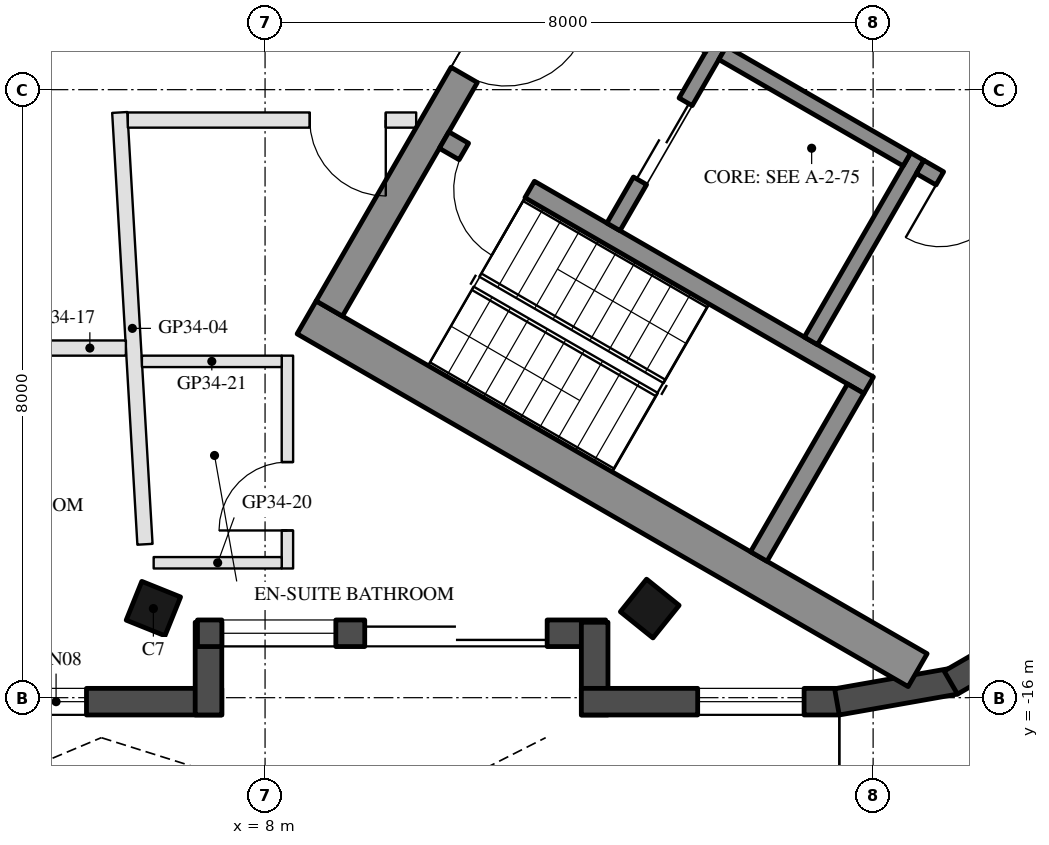
"""IFC4 building model, lengths in metres.
Left out: names, types, materials, properties, quantities, classifications, styles, units other than length and angle.
Written with IfcOpenShell. Run it as: python <this file> out.ifc"""

import sys

from ifc_helpers import new_model, si_unit, direction, frame, frame_2d, origin, origin_2d, place, context, subcontext, project, spatial, rectangle, hollow_rectangle, extrude, boolean, halfspace, element, fill, save


model = new_model("IFC4")
c1 = context("Model", 3, precision=1e-05, world=origin(), true_north=direction((0.0, 1.0)))
c2 = subcontext(c1, "Body", "Model", "MODEL_VIEW")
j1 = project(units=[si_unit("LENGTHUNIT", "METRE"), si_unit("PLANEANGLEUNIT", "RADIAN")], contexts=[c1])
p1 = place(None, origin())
s1 = spatial("IfcSite", under=j1, at=p1, CompositionType="ELEMENT")
p2 = place(p1, origin())
s2 = spatial("IfcBuilding", under=s1, at=p2, CompositionType="ELEMENT")
p3 = place(p2, frame((0.0, 0.0, 320.7)))
s3 = spatial("IfcBuildingStorey", under=s2, at=p3, CompositionType="ELEMENT", Elevation=320.7)
p4 = place(p3, frame((6.531, -14.827, 0.0), z_axis=(-0.060871062735, 0.151168564354, 0.986632038235), x_axis=(0.998135304591, 0.004721094283, 0.0608574153)))
e1 = element("IfcColumn", 1, at=p4, inside=s3, PredefinedType="COLUMN", context=c2, shape_type="SweptSolid", body=[
    boolean("DIFFERENCE", boolean("DIFFERENCE", extrude(hollow_rectangle(XDim=0.55, YDim=0.55, WallThickness=0.025, at=origin_2d()), origin(), (0.0, 0.0, 1.0), 3.75), halfspace(frame((0.0, 0.0, 0.034), z_axis=(0.0, 0.0, 1.0), x_axis=(1.0, 0.0, 0.0)), True)), halfspace(frame((0.0, 0.0, 3.716), z_axis=(0.0, 0.0, 1.0), x_axis=(1.0, 0.0, 0.0)), False)),
])
p5 = place(p3, frame((13.061, -14.827, 0.0), z_axis=(-0.121007284992, 0.150336498529, 0.981201393287), x_axis=(0.992609775631, 0.009249858451, 0.120996997646)))
e2 = element("IfcColumn", 2, at=p5, inside=s3, PredefinedType="COLUMN", context=c2, shape_type="SweptSolid", body=[
    boolean("DIFFERENCE", boolean("DIFFERENCE", extrude(hollow_rectangle(XDim=0.55, YDim=0.55, WallThickness=0.025, at=origin_2d()), origin(), (0.0, 0.0, 1.0), 3.771), halfspace(frame((0.0, 0.0, 0.04), z_axis=(0.0, 0.0, 1.0), x_axis=(1.0, 0.0, 0.0)), True)), halfspace(frame((0.0, 0.0, 3.731), z_axis=(0.0, 0.0, 1.0), x_axis=(1.0, 0.0, 0.0)), False)),
])
p6 = place(p3, frame((-0.9, -16.052, 0.0), z_axis=(0.0, 0.0, 1.0), x_axis=(1.0, 0.0, 0.0)))
e3 = element("IfcWall", 3, at=p6, inside=s3, PredefinedType="SOLIDWALL", context=c2, shape_type="SweptSolid", body=[
    extrude(rectangle(XDim=8.331, YDim=0.35, at=frame_2d((4.165, 0.0))), origin(), (0.0, 0.0, 1.0), 3.55),
])
p7 = place(p6, frame((1.539, 0.0, 0.0)))
e4 = element("IfcOpeningElement", 4, at=p7, cuts=e3, PredefinedType="OPENING", context=c2, shape_type="SweptSolid", body=[
    extrude(rectangle(XDim=1.2, YDim=2.4, at=frame_2d((0.6, 1.2))), frame((0.0, 0.185, 0.0), z_axis=(0.0, -1.0, 0.0), x_axis=(1.0, 0.0, 0.0)), (0.0, 0.0, 1.0), 0.37),
])
p8 = place(p6, frame((3.65, 0.0, 0.0)))
e5 = element("IfcOpeningElement", 5, at=p8, cuts=e3, PredefinedType="OPENING", context=c2, shape_type="SweptSolid", body=[
    extrude(rectangle(XDim=1.8, YDim=2.4, at=frame_2d((0.9, 1.2))), frame((0.0, 0.185, 0.0), z_axis=(0.0, -1.0, 0.0), x_axis=(1.0, 0.0, 0.0)), (0.0, 0.0, 1.0), 0.37),
])
p9 = place(p6, frame((5.75, 0.0, 0.3)))
e6 = element("IfcOpeningElement", 6, at=p9, cuts=e3, PredefinedType="OPENING", context=c2, shape_type="SweptSolid", body=[
    extrude(rectangle(XDim=0.8, YDim=2.65, at=frame_2d((0.4, 1.325))), frame((0.0, 0.185, 0.0), z_axis=(0.0, -1.0, 0.0), x_axis=(1.0, 0.0, 0.0)), (0.0, 0.0, 1.0), 0.37),
])
p10 = place(p3, frame((7.256, -16.228, 0.0), z_axis=(0.0, 0.0, 1.0), x_axis=(0.0, 1.0, 0.0)))
e7 = element("IfcWall", 7, at=p10, inside=s3, PredefinedType="SOLIDWALL", context=c2, shape_type="SweptSolid", body=[
    extrude(rectangle(XDim=1.22, YDim=0.35, at=frame_2d((0.61, 0.0))), origin(), (0.0, 0.0, 1.0), 3.55),
])
p11 = place(p3, frame((7.111, -15.153, 0.0), z_axis=(0.0, 0.0, 1.0), x_axis=(1.0, 0.0, 0.0)))
e8 = element("IfcWall", 8, at=p11, inside=s3, PredefinedType="SOLIDWALL", context=c2, shape_type="SweptSolid", body=[
    extrude(rectangle(XDim=5.371, YDim=0.35, at=frame_2d((2.686, 0.0))), origin(), (0.0, 0.0, 1.0), 3.55),
])
p12 = place(p11, frame((2.201, 0.0, 0.0)))
e9 = element("IfcOpeningElement", 9, at=p12, cuts=e8, PredefinedType="OPENING", context=c2, shape_type="SweptSolid", body=[
    extrude(rectangle(XDim=2.4, YDim=2.4, at=frame_2d((1.2, 1.2))), frame((0.0, 0.185, 0.0), z_axis=(0.0, -1.0, 0.0), x_axis=(1.0, 0.0, 0.0)), (0.0, 0.0, 1.0), 0.37),
])
p13 = place(p11, frame((0.32, 0.0, 0.3)))
e10 = element("IfcOpeningElement", 10, at=p13, cuts=e8, PredefinedType="OPENING", context=c2, shape_type="SweptSolid", body=[
    extrude(rectangle(XDim=1.5, YDim=2.65, at=frame_2d((0.75, 1.325))), frame((0.0, 0.185, 0.0), z_axis=(0.0, -1.0, 0.0), x_axis=(1.0, 0.0, 0.0)), (0.0, 0.0, 1.0), 0.37),
])
p14 = place(p3, frame((12.336, -15.008, 0.0), z_axis=(0.0, 0.0, 1.0), x_axis=(0.0, -1.0, 0.0)))
e11 = element("IfcWall", 11, at=p14, inside=s3, PredefinedType="SOLIDWALL", context=c2, shape_type="SweptSolid", body=[
    extrude(rectangle(XDim=1.22, YDim=0.35, at=frame_2d((0.61, 0.0))), origin(), (0.0, 0.0, 1.0), 3.55),
])
p15 = place(p3, frame((12.161, -16.052, 0.0), z_axis=(0.0, 0.0, 1.0), x_axis=(1.0, 0.0, 0.0)))
e12 = element("IfcWall", 12, at=p15, inside=s3, PredefinedType="SOLIDWALL", context=c2, shape_type="SweptSolid", body=[
    extrude(rectangle(XDim=3.393, YDim=0.35, at=frame_2d((1.697, 0.0))), origin(), (0.0, 0.0, 1.0), 3.55),
])
p16 = place(p15, frame((1.531, 0.0, 0.3)))
e13 = element("IfcOpeningElement", 13, at=p16, cuts=e12, PredefinedType="OPENING", context=c2, shape_type="SweptSolid", body=[
    extrude(rectangle(XDim=1.4, YDim=2.65, at=frame_2d((0.7, 1.325))), frame((0.0, 0.185, 0.0), z_axis=(0.0, -1.0, 0.0), x_axis=(1.0, 0.0, 0.0)), (0.0, 0.0, 1.0), 0.37),
])
for number, where, z_axis, x_axis in (
    (14, (15.524, -16.055, 0.0), (0.0, 0.0, 1.0), (0.985, 0.174, 0.0)),
    (15, (17.022, -15.802, 0.0), (0.0, 0.0, 1.0), (0.866, 0.5, 0.0)),
):
    element("IfcWall", number, at=place(p3, frame(where, z_axis=z_axis, x_axis=x_axis)), inside=s3, PredefinedType="SOLIDWALL", context=c2, shape_type="SweptSolid", body=[
        extrude(rectangle(XDim=1.579, YDim=0.35, at=frame_2d((0.79, 0.0))), origin(), (0.0, 0.0, 1.0), 3.55),
    ])
p17 = place(p3, frame((8.547, -10.997, 0.0), z_axis=(0.0, 0.0, 1.0), x_axis=(0.866025286072, -0.500000203884, 0.0)))
e16 = element("IfcWall", 16, at=p17, inside=s3, PredefinedType="SHEAR", context=c2, shape_type="SweptSolid", body=[
    extrude(rectangle(XDim=9.283, YDim=0.5, at=frame_2d((4.641, 0.0))), origin(), (0.0, 0.0, 1.0), 3.5),
])
p18 = place(p3, frame((8.845, -10.88, 0.0), z_axis=(0.0, 0.0, 1.0), x_axis=(0.500004234368, 0.866022959057, 0.0)))
e17 = element("IfcWall", 17, at=p18, inside=s3, PredefinedType="SHEAR", context=c2, shape_type="SweptSolid", body=[
    extrude(rectangle(XDim=10.0, YDim=0.4, at=frame_2d((5.0, 0.0))), origin(), (0.0, 0.0, 1.0), 3.5),
])
p19 = place(p18, frame((3.55, 0.0, 0.0)))
e18 = element("IfcOpeningElement", 18, at=p19, cuts=e17, PredefinedType="OPENING", context=c2, shape_type="SweptSolid", body=[
    extrude(rectangle(XDim=1.1, YDim=2.1, at=frame_2d((0.55, 1.05))), frame((0.0, 0.21, 0.0), z_axis=(0.0, -1.0, 0.0), x_axis=(1.0, 0.0, 0.0)), (0.0, 0.0, 1.0), 0.42),
])
p20 = place(p18, frame((5.85, 0.0, 0.0)))
e19 = element("IfcOpeningElement", 19, at=p20, cuts=e17, PredefinedType="OPENING", context=c2, shape_type="SweptSolid", body=[
    extrude(rectangle(XDim=1.4, YDim=2.1, at=frame_2d((0.7, 1.05))), frame((0.0, 0.21, 0.0), z_axis=(0.0, -1.0, 0.0), x_axis=(1.0, 0.0, 0.0)), (0.0, 0.0, 1.0), 0.42),
])
p21 = place(p3, frame((10.356, -8.664, 0.0), z_axis=(0.0, 0.0, 1.0), x_axis=(0.866028629588, -0.499994412703, 0.0)))
e20 = element("IfcWall", 20, at=p21, inside=s3, PredefinedType="SHEAR", context=c2, shape_type="SweptSolid", body=[
    extrude(rectangle(XDim=6.45, YDim=0.25, at=frame_2d((3.225, 0.0))), origin(), (0.0, 0.0, 1.0), 3.5),
])
p22 = place(p21, frame((0.3, 0.0, 0.0)))
e21 = element("IfcOpeningElement", 21, at=p22, cuts=e20, PredefinedType="OPENING", context=c2, shape_type="SweptSolid", body=[
    extrude(rectangle(XDim=1.0, YDim=2.1, at=frame_2d((0.5, 1.05))), frame((0.0, 0.135, 0.0), z_axis=(0.0, -1.0, 0.0), x_axis=(1.0, 0.0, 0.0)), (0.0, 0.0, 1.0), 0.27),
])
p23 = place(p3, frame((14.496, -14.143, 0.0), z_axis=(0.0, 0.0, 1.0), x_axis=(0.500062241894, 0.865989465428, 0.0)))
e22 = element("IfcWall", 22, at=p23, inside=s3, PredefinedType="SHEAR", context=c2, shape_type="SweptSolid", body=[
    extrude(rectangle(XDim=2.55, YDim=0.25, at=frame_2d((1.275, 0.0))), origin(), (0.0, 0.0, 1.0), 3.5),
])
p24 = place(p3, frame((15.181, -11.305, 0.0), z_axis=(0.0, 0.0, 1.0), x_axis=(0.49994636267, 0.866056369097, 0.0)))
e23 = element("IfcWall", 23, at=p24, inside=s3, PredefinedType="SHEAR", context=c2, shape_type="SweptSolid", body=[
    extrude(rectangle(XDim=2.8, YDim=0.2, at=frame_2d((1.4, 0.0))), origin(), (0.0, 0.0, 1.0), 3.5),
])
p25 = place(p3, frame((12.583, -9.805, 0.0), z_axis=(0.0, 0.0, 1.0), x_axis=(0.49994636267, 0.866056369097, 0.0)))
e24 = element("IfcWall", 24, at=p25, inside=s3, PredefinedType="SHEAR", context=c2, shape_type="SweptSolid", body=[
    extrude(rectangle(XDim=2.8, YDim=0.2, at=frame_2d((1.4, 0.0))), origin(), (0.0, 0.0, 1.0), 3.5),
])
p26 = place(p25, frame((0.7, 0.0, 0.0)))
e25 = element("IfcOpeningElement", 25, at=p26, cuts=e24, PredefinedType="OPENING", context=c2, shape_type="SweptSolid", body=[
    extrude(rectangle(XDim=1.2, YDim=2.1, at=frame_2d((0.6, 1.05))), frame((0.0, 0.11, 0.0), z_axis=(0.0, -1.0, 0.0), x_axis=(1.0, 0.0, 0.0)), (0.0, 0.0, 1.0), 0.22),
])
p27 = place(p3, frame((11.768, -6.217, 0.0), z_axis=(0.0, 0.0, 1.0), x_axis=(0.866050077142, -0.499957262057, 0.0)))
e26 = element("IfcWall", 26, at=p27, inside=s3, PredefinedType="SHEAR", context=c2, shape_type="SweptSolid", body=[
    extrude(rectangle(XDim=2.4, YDim=0.2, at=frame_2d((1.2, 0.0))), origin(), (0.0, 0.0, 1.0), 3.5),
])
p28 = place(p3, frame((14.02, -7.517, 0.0), z_axis=(0.0, 0.0, 1.0), x_axis=(0.866034573852, -0.49998411664, 0.0)))
e27 = element("IfcWall", 27, at=p28, inside=s3, PredefinedType="SHEAR", context=c2, shape_type="SweptSolid", body=[
    extrude(rectangle(XDim=2.8, YDim=0.2, at=frame_2d((1.4, 0.0))), origin(), (0.0, 0.0, 1.0), 3.5),
])
p29 = place(p3, frame((12.968, -4.138, 0.0), z_axis=(0.0, 0.0, 1.0), x_axis=(0.866025710499, -0.499999468754, 0.0)))
e28 = element("IfcWall", 28, at=p29, inside=s3, PredefinedType="SHEAR", context=c2, shape_type="SweptSolid", body=[
    extrude(rectangle(XDim=10.121, YDim=0.2, at=frame_2d((5.061, 0.0))), origin(), (0.0, 0.0, 1.0), 3.5),
])
p30 = place(p29, frame((0.62, 0.0, 0.0)))
e29 = element("IfcOpeningElement", 29, at=p30, cuts=e28, PredefinedType="OPENING", context=c2, shape_type="SweptSolid", body=[
    extrude(rectangle(XDim=1.1, YDim=2.1, at=frame_2d((0.55, 1.05))), frame((0.0, 0.11, 0.0), z_axis=(0.0, -1.0, 0.0), x_axis=(1.0, 0.0, 0.0)), (0.0, 0.0, 1.0), 0.22),
])
p31 = place(p29, frame((5.8, 0.0, 0.0)))
e30 = element("IfcOpeningElement", 30, at=p31, cuts=e28, PredefinedType="OPENING", context=c2, shape_type="SweptSolid", body=[
    extrude(rectangle(XDim=0.9, YDim=2.1, at=frame_2d((0.45, 1.05))), frame((0.0, 0.11, 0.0), z_axis=(0.0, -1.0, 0.0), x_axis=(1.0, 0.0, 0.0)), (0.0, 0.0, 1.0), 0.22),
])
p32 = place(p3, frame((16.618, -9.017, 0.0), z_axis=(0.0, 0.0, 1.0), x_axis=(0.866045268016, -0.499965592563, 0.0)))
e31 = element("IfcWall", 31, at=p32, inside=s3, PredefinedType="SHEAR", context=c2, shape_type="SweptSolid", body=[
    extrude(rectangle(XDim=2.608, YDim=0.2, at=frame_2d((1.304, 0.0))), origin(), (0.0, 0.0, 1.0), 3.5),
])
p33 = place(p32, frame((0.3, 0.0, 0.0)))
e32 = element("IfcOpeningElement", 32, at=p33, cuts=e31, PredefinedType="OPENING", context=c2, shape_type="SweptSolid", body=[
    extrude(rectangle(XDim=0.9, YDim=2.1, at=frame_2d((0.45, 1.05))), frame((0.0, 0.11, 0.0), z_axis=(0.0, -1.0, 0.0), x_axis=(1.0, 0.0, 0.0)), (0.0, 0.0, 1.0), 0.22),
])
p34 = place(p3, frame((6.42, -13.982, 0.0), z_axis=(0.0, 0.0, 1.0), x_axis=(-0.058254288977, 0.998301776927, 0.0)))
e33 = element("IfcWall", 33, at=p34, inside=s3, PredefinedType="PARTITIONING", context=c2, shape_type="SweptSolid", body=[
    extrude(rectangle(XDim=5.691, YDim=0.2, at=frame_2d((2.846, 0.0))), origin(), (0.0, 0.0, 1.0), 3.15),
])
p35 = place(p3, frame((6.169, -11.4, 0.0), z_axis=(0.0, 0.0, 1.0), x_axis=(-1.0, 0.0, 0.0)))
e34 = element("IfcWall", 34, at=p35, inside=s3, PredefinedType="PARTITIONING", context=c2, shape_type="SweptSolid", body=[
    extrude(rectangle(XDim=3.951, YDim=0.2, at=frame_2d((1.976, 0.0))), origin(), (0.0, 0.0, 1.0), 3.15),
])
p36 = place(p35, frame((1.476, 0.0, 0.0)))
e35 = element("IfcOpeningElement", 35, at=p36, cuts=e34, PredefinedType="OPENING", context=c2, shape_type="SweptSolid", body=[
    extrude(rectangle(XDim=1.0, YDim=2.1, at=frame_2d((0.5, 1.05))), frame((0.0, 0.11, 0.0), z_axis=(0.0, -1.0, 0.0), x_axis=(1.0, 0.0, 0.0)), (0.0, 0.0, 1.0), 0.22),
])
p37 = place(p3, frame((9.988, -8.4, 0.0), z_axis=(0.0, 0.0, 1.0), x_axis=(-1.0, 0.0, 0.0)))
e36 = element("IfcWall", 36, at=p37, inside=s3, PredefinedType="PARTITIONING", context=c2, shape_type="SweptSolid", body=[
    extrude(rectangle(XDim=3.794, YDim=0.2, at=frame_2d((1.897, 0.0))), origin(), (0.0, 0.0, 1.0), 3.15),
])
p38 = place(p37, frame((0.4, 0.0, 0.0)))
e37 = element("IfcOpeningElement", 37, at=p38, cuts=e36, PredefinedType="OPENING", context=c2, shape_type="SweptSolid", body=[
    extrude(rectangle(XDim=1.0, YDim=2.1, at=frame_2d((0.5, 1.05))), frame((0.0, 0.11, 0.0), z_axis=(0.0, -1.0, 0.0), x_axis=(1.0, 0.0, 0.0)), (0.0, 0.0, 1.0), 0.22),
])
p39 = place(p3, frame((8.294, -14.3, 0.0), z_axis=(0.0, 0.0, 1.0), x_axis=(0.0, 1.0, 0.0)))
e38 = element("IfcWall", 38, at=p39, inside=s3, PredefinedType="PARTITIONING", context=c2, shape_type="SweptSolid", body=[
    extrude(rectangle(XDim=2.8, YDim=0.15, at=frame_2d((1.4, 0.0))), origin(), (0.0, 0.0, 1.0), 3.1),
])
p40 = place(p39, frame((0.5, 0.0, 0.0)))
e39 = element("IfcOpeningElement", 39, at=p40, cuts=e38, PredefinedType="OPENING", context=c2, shape_type="SweptSolid", body=[
    extrude(rectangle(XDim=0.9, YDim=2.1, at=frame_2d((0.45, 1.05))), frame((0.0, 0.085, 0.0), z_axis=(0.0, -1.0, 0.0), x_axis=(1.0, 0.0, 0.0)), (0.0, 0.0, 1.0), 0.17),
])
p41 = place(p3, frame((6.534, -14.225, 0.0), z_axis=(0.0, 0.0, 1.0), x_axis=(1.0, 0.0, 0.0)))
e40 = element("IfcWall", 40, at=p41, inside=s3, PredefinedType="PARTITIONING", context=c2, shape_type="SweptSolid", body=[
    extrude(rectangle(XDim=1.685, YDim=0.15, at=frame_2d((0.842, 0.0))), origin(), (0.0, 0.0, 1.0), 3.1),
])
p42 = place(p3, frame((6.38, -11.575, 0.0), z_axis=(0.0, 0.0, 1.0), x_axis=(1.0, 0.0, 0.0)))
e41 = element("IfcWall", 41, at=p42, inside=s3, PredefinedType="PARTITIONING", context=c2, shape_type="SweptSolid", body=[
    extrude(rectangle(XDim=1.839, YDim=0.15, at=frame_2d((0.92, 0.0))), origin(), (0.0, 0.0, 1.0), 3.15),
])
p43 = place(p9, origin())
e42 = element("IfcWindow", 42, at=p43, inside=s3, PartitioningType="SINGLE_PANEL", PredefinedType="WINDOW", context=c2, shape_type="SweptSolid", body=[
    extrude(rectangle(XDim=0.8, YDim=2.65, at=frame_2d((0.4, 1.325))), frame((0.0, 0.03, 0.0), z_axis=(0.0, -1.0, 0.0), x_axis=(1.0, 0.0, 0.0)), (0.0, 0.0, 1.0), 0.06),
])
fill(e6, e42)
p44 = place(p12, frame((2.4, 0.0, 0.0), z_axis=(0.0, 0.0, 1.0), x_axis=(-1.0, 0.0, 0.0)))
e43 = element("IfcDoor", 43, at=p44, inside=s3, OperationType="SLIDING_TO_LEFT", PredefinedType="DOOR", context=c2, shape_type="SweptSolid", body=[
    extrude(rectangle(XDim=2.4, YDim=2.4, at=frame_2d((1.2, 1.2))), frame((0.0, 0.025, 0.0), z_axis=(0.0, -1.0, 0.0), x_axis=(1.0, 0.0, 0.0)), (0.0, 0.0, 1.0), 0.05),
])
fill(e9, e43)
p45 = place(p13, origin())
e44 = element("IfcWindow", 44, at=p45, inside=s3, PartitioningType="SINGLE_PANEL", PredefinedType="WINDOW", context=c2, shape_type="SweptSolid", body=[
    extrude(rectangle(XDim=1.5, YDim=2.65, at=frame_2d((0.75, 1.325))), frame((0.0, 0.03, 0.0), z_axis=(0.0, -1.0, 0.0), x_axis=(1.0, 0.0, 0.0)), (0.0, 0.0, 1.0), 0.06),
])
fill(e10, e44)
p46 = place(p16, origin())
e45 = element("IfcWindow", 45, at=p46, inside=s3, PartitioningType="SINGLE_PANEL", PredefinedType="WINDOW", context=c2, shape_type="SweptSolid", body=[
    extrude(rectangle(XDim=1.4, YDim=2.65, at=frame_2d((0.7, 1.325))), frame((0.0, 0.03, 0.0), z_axis=(0.0, -1.0, 0.0), x_axis=(1.0, 0.0, 0.0)), (0.0, 0.0, 1.0), 0.06),
])
fill(e13, e45)
p47 = place(p26, origin())
e46 = element("IfcDoor", 46, at=p47, inside=s3, OperationType="DOUBLE_DOOR_SLIDING", PredefinedType="DOOR", context=c2, shape_type="SweptSolid", body=[
    extrude(rectangle(XDim=1.2, YDim=2.1, at=frame_2d((0.6, 1.05))), frame((0.0, 0.025, 0.0), z_axis=(0.0, -1.0, 0.0), x_axis=(1.0, 0.0, 0.0)), (0.0, 0.0, 1.0), 0.05),
])
fill(e25, e46)
p48 = place(p33, frame((0.9, 0.0, 0.0), z_axis=(0.0, 0.0, 1.0), x_axis=(-1.0, 0.0, 0.0)))
e47 = element("IfcDoor", 47, at=p48, inside=s3, OperationType="SINGLE_SWING_RIGHT", PredefinedType="DOOR", context=c2, shape_type="SweptSolid", body=[
    extrude(rectangle(XDim=0.9, YDim=2.1, at=frame_2d((0.45, 1.05))), frame((0.0, 0.025, 0.0), z_axis=(0.0, -1.0, 0.0), x_axis=(1.0, 0.0, 0.0)), (0.0, 0.0, 1.0), 0.05),
])
fill(e32, e47)
p49 = place(p19, frame((1.1, 0.0, 0.0), z_axis=(0.0, 0.0, 1.0), x_axis=(-1.0, 0.0, 0.0)))
e48 = element("IfcDoor", 48, at=p49, inside=s3, OperationType="SINGLE_SWING_LEFT", PredefinedType="DOOR", context=c2, shape_type="SweptSolid", body=[
    extrude(rectangle(XDim=1.1, YDim=2.1, at=frame_2d((0.55, 1.05))), frame((0.0, 0.025, 0.0), z_axis=(0.0, -1.0, 0.0), x_axis=(1.0, 0.0, 0.0)), (0.0, 0.0, 1.0), 0.05),
])
fill(e18, e48)
p50 = place(p22, frame((1.0, 0.0, 0.0), z_axis=(0.0, 0.0, 1.0), x_axis=(-1.0, 0.0, 0.0)))
e49 = element("IfcDoor", 49, at=p50, inside=s3, OperationType="SINGLE_SWING_LEFT", PredefinedType="DOOR", context=c2, shape_type="SweptSolid", body=[
    extrude(rectangle(XDim=1.0, YDim=2.1, at=frame_2d((0.5, 1.05))), frame((0.0, 0.025, 0.0), z_axis=(0.0, -1.0, 0.0), x_axis=(1.0, 0.0, 0.0)), (0.0, 0.0, 1.0), 0.05),
])
fill(e21, e49)
p51 = place(p40, origin())
e50 = element("IfcDoor", 50, at=p51, inside=s3, OperationType="SINGLE_SWING_LEFT", PredefinedType="DOOR", context=c2, shape_type="SweptSolid", body=[
    extrude(rectangle(XDim=0.9, YDim=2.1, at=frame_2d((0.45, 1.05))), frame((0.0, 0.025, 0.0), z_axis=(0.0, -1.0, 0.0), x_axis=(1.0, 0.0, 0.0)), (0.0, 0.0, 1.0), 0.05),
])
fill(e39, e50)
p52 = place(p38, origin())
e51 = element("IfcDoor", 51, at=p52, inside=s3, OperationType="SINGLE_SWING_LEFT", PredefinedType="DOOR", context=c2, shape_type="SweptSolid", body=[
    extrude(rectangle(XDim=1.0, YDim=2.1, at=frame_2d((0.5, 1.05))), frame((0.0, 0.025, 0.0), z_axis=(0.0, -1.0, 0.0), x_axis=(1.0, 0.0, 0.0)), (0.0, 0.0, 1.0), 0.05),
])
fill(e37, e51)
save(model, sys.argv[1])
